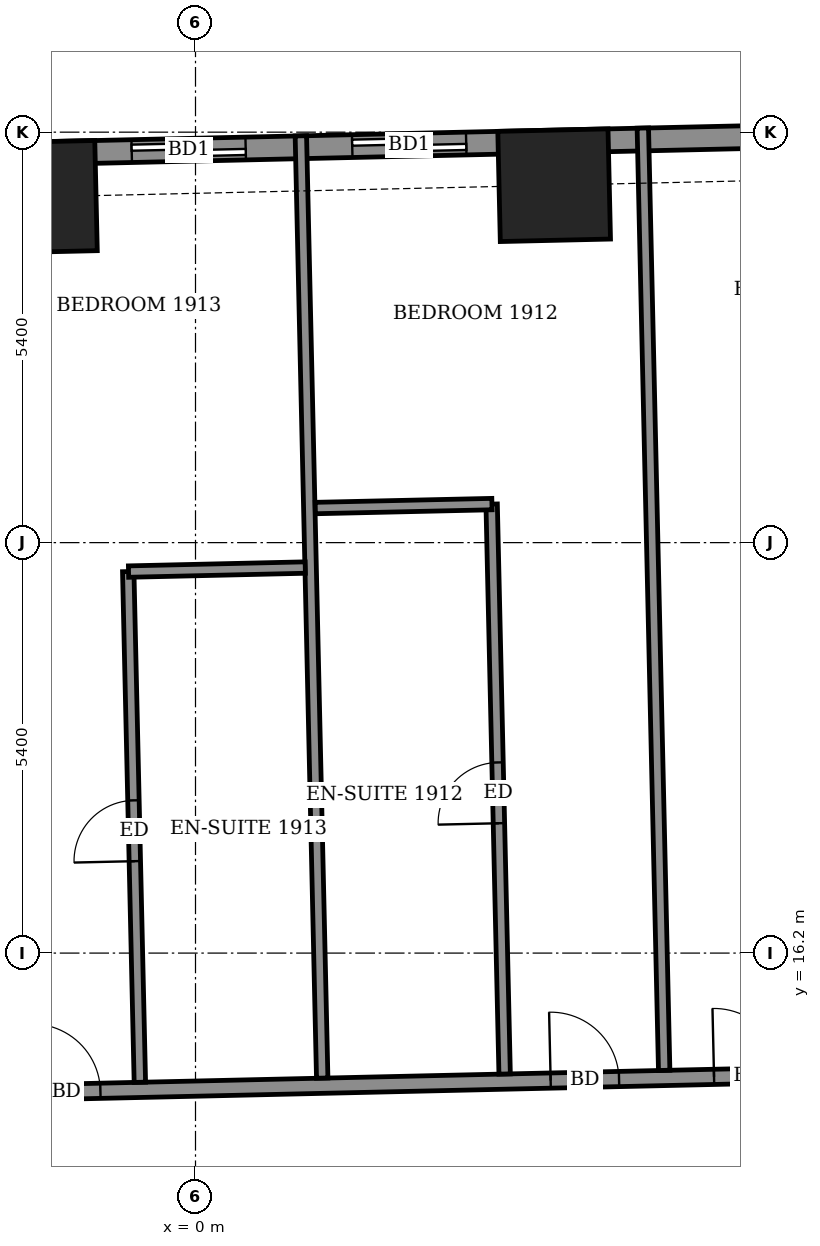
"""IFC4 building model, lengths in metres.
Left out: names, types, materials, properties, quantities, classifications, styles, units other than length and angle.
Written with IfcOpenShell. Run it as: python <this file> out.ifc"""

import sys

from ifc_helpers import new_model, si_unit, direction, frame, frame_2d, origin, origin_2d, place, context, subcontext, project, spatial, rectangle, extrude, element, fill, save


model = new_model("IFC4")
c1 = context("Model", 3, precision=1e-05, world=origin(), true_north=direction((0.0, 1.0)))
c2 = subcontext(c1, "Body", "Model", "MODEL_VIEW")
j1 = project(units=[si_unit("LENGTHUNIT", "METRE"), si_unit("PLANEANGLEUNIT", "RADIAN")], contexts=[c1])
p1 = place(None, origin())
s1 = spatial("IfcSite", under=j1, at=p1, CompositionType="ELEMENT")
p2 = place(p1, origin())
s2 = spatial("IfcBuilding", under=s1, at=p2, CompositionType="ELEMENT")
p3 = place(p2, frame((0.0, 0.0, 79.3)))
s3 = spatial("IfcBuildingStorey", under=s2, at=p3, CompositionType="ELEMENT", Elevation=79.3)
for number, where, z_axis, x_axis in (
    (1, (4.719, 26.302, -0.55), (0.0, 0.0, 1.0), (-1.0, -0.023, 0.0)),
    (2, (-2.033, 26.149, -0.55), (0.0, 0.0, 1.0), (-1.0, -0.023, 0.0)),
):
    element("IfcColumn", number, at=place(p3, frame(where, z_axis=z_axis, x_axis=x_axis)), inside=s3, PredefinedType="COLUMN", context=c2, shape_type="SweptSolid", body=[
        extrude(rectangle(XDim=1.45, YDim=1.45, at=origin_2d()), origin(), (0.0, 0.0, 1.0), 3.6),
    ])
p4 = place(p3, frame((24.809, 27.333, 0.0), z_axis=(0.0, 0.0, 1.0), x_axis=(-0.999742489858, -0.022692597327, 0.0)))
e3 = element("IfcWall", 3, at=p4, inside=s3, PredefinedType="SOLIDWALL", context=c2, shape_type="SweptSolid", body=[
    extrude(rectangle(XDim=46.972, YDim=0.3, at=frame_2d((23.486, 0.0))), origin(), (0.0, 0.0, 1.0), 3.05),
])
p5 = place(p4, frame((2.536, 0.0, 0.0)))
e4 = element("IfcOpeningElement", 4, at=p5, cuts=e3, PredefinedType="OPENING", context=c2, shape_type="SweptSolid", body=[
    extrude(rectangle(XDim=1.5, YDim=2.4, at=frame_2d((0.75, 1.2))), frame((0.0, 0.16, 0.0), z_axis=(0.0, -1.0, 0.0), x_axis=(1.0, 0.0, 0.0)), (0.0, 0.0, 1.0), 0.32),
])
p6 = place(p4, frame((7.726, 0.0, 0.0)))
e5 = element("IfcOpeningElement", 5, at=p6, cuts=e3, PredefinedType="OPENING", context=c2, shape_type="SweptSolid", body=[
    extrude(rectangle(XDim=1.5, YDim=2.4, at=frame_2d((0.75, 1.2))), frame((0.0, 0.16, 0.0), z_axis=(0.0, -1.0, 0.0), x_axis=(1.0, 0.0, 0.0)), (0.0, 0.0, 1.0), 0.32),
])
p7 = place(p4, frame((10.627, 0.0, 0.0)))
e6 = element("IfcOpeningElement", 6, at=p7, cuts=e3, PredefinedType="OPENING", context=c2, shape_type="SweptSolid", body=[
    extrude(rectangle(XDim=1.5, YDim=2.4, at=frame_2d((0.75, 1.2))), frame((0.0, 0.16, 0.0), z_axis=(0.0, -1.0, 0.0), x_axis=(1.0, 0.0, 0.0)), (0.0, 0.0, 1.0), 0.32),
])
p8 = place(p4, frame((15.872, 0.0, 0.0)))
e7 = element("IfcOpeningElement", 7, at=p8, cuts=e3, PredefinedType="OPENING", context=c2, shape_type="SweptSolid", body=[
    extrude(rectangle(XDim=1.5, YDim=2.4, at=frame_2d((0.75, 1.2))), frame((0.0, 0.16, 0.0), z_axis=(0.0, -1.0, 0.0), x_axis=(1.0, 0.0, 0.0)), (0.0, 0.0, 1.0), 0.32),
])
p9 = place(p4, frame((21.253, 0.0, 0.0)))
e8 = element("IfcOpeningElement", 8, at=p9, cuts=e3, PredefinedType="OPENING", context=c2, shape_type="SweptSolid", body=[
    extrude(rectangle(XDim=1.5, YDim=2.4, at=frame_2d((0.75, 1.2))), frame((0.0, 0.16, 0.0), z_axis=(0.0, -1.0, 0.0), x_axis=(1.0, 0.0, 0.0)), (0.0, 0.0, 1.0), 0.32),
])
p10 = place(p4, frame((24.155, 0.0, 0.0)))
e9 = element("IfcOpeningElement", 9, at=p10, cuts=e3, PredefinedType="OPENING", context=c2, shape_type="SweptSolid", body=[
    extrude(rectangle(XDim=1.5, YDim=2.4, at=frame_2d((0.75, 1.2))), frame((0.0, 0.16, 0.0), z_axis=(0.0, -1.0, 0.0), x_axis=(1.0, 0.0, 0.0)), (0.0, 0.0, 1.0), 0.32),
])
p11 = place(p4, frame((29.247, 0.0, 0.0)))
e10 = element("IfcOpeningElement", 10, at=p11, cuts=e3, PredefinedType="OPENING", context=c2, shape_type="SweptSolid", body=[
    extrude(rectangle(XDim=1.5, YDim=2.4, at=frame_2d((0.75, 1.2))), frame((0.0, 0.16, 0.0), z_axis=(0.0, -1.0, 0.0), x_axis=(1.0, 0.0, 0.0)), (0.0, 0.0, 1.0), 0.32),
])
p12 = place(p4, frame((34.581, 0.0, 0.0)))
e11 = element("IfcOpeningElement", 11, at=p12, cuts=e3, PredefinedType="OPENING", context=c2, shape_type="SweptSolid", body=[
    extrude(rectangle(XDim=1.5, YDim=2.4, at=frame_2d((0.75, 1.2))), frame((0.0, 0.16, 0.0), z_axis=(0.0, -1.0, 0.0), x_axis=(1.0, 0.0, 0.0)), (0.0, 0.0, 1.0), 0.32),
])
p13 = place(p4, frame((37.483, 0.0, 0.0)))
e12 = element("IfcOpeningElement", 12, at=p13, cuts=e3, PredefinedType="OPENING", context=c2, shape_type="SweptSolid", body=[
    extrude(rectangle(XDim=1.5, YDim=2.4, at=frame_2d((0.75, 1.2))), frame((0.0, 0.16, 0.0), z_axis=(0.0, -1.0, 0.0), x_axis=(1.0, 0.0, 0.0)), (0.0, 0.0, 1.0), 0.32),
])
p14 = place(p4, frame((42.35, 0.0, 0.9)))
e13 = element("IfcOpeningElement", 13, at=p14, cuts=e3, PredefinedType="OPENING", context=c2, shape_type="SweptSolid", body=[
    extrude(rectangle(XDim=2.4, YDim=1.5, at=frame_2d((1.2, 0.75))), frame((0.0, 0.16, 0.0), z_axis=(0.0, -1.0, 0.0), x_axis=(1.0, 0.0, 0.0)), (0.0, 0.0, 1.0), 0.32),
])
p15 = place(p3, frame((-24.895, 13.852, 0.0), z_axis=(0.0, 0.0, 1.0), x_axis=(0.999742765181, 0.02268046447, 0.0)))
e14 = element("IfcWall", 14, at=p15, inside=s3, PredefinedType="PARTITIONING", context=c2, shape_type="SweptSolid", body=[
    extrude(rectangle(XDim=52.422, YDim=0.2, at=frame_2d((26.211, 0.0))), origin(), (0.0, 0.0, 1.0), 3.05),
])
p16 = place(p15, frame((50.186, 0.0, 0.0)))
e15 = element("IfcOpeningElement", 15, at=p16, cuts=e14, PredefinedType="OPENING", context=c2, shape_type="SweptSolid", body=[
    extrude(rectangle(XDim=1.0, YDim=2.1, at=frame_2d((0.5, 1.05))), frame((0.0, 0.11, 0.0), z_axis=(0.0, -1.0, 0.0), x_axis=(1.0, 0.0, 0.0)), (0.0, 0.0, 1.0), 0.22),
])
p17 = place(p15, frame((45.175, 0.0, 0.0)))
e16 = element("IfcOpeningElement", 16, at=p17, cuts=e14, PredefinedType="OPENING", context=c2, shape_type="SweptSolid", body=[
    extrude(rectangle(XDim=0.9, YDim=2.1, at=frame_2d((0.45, 1.05))), frame((0.0, 0.11, 0.0), z_axis=(0.0, -1.0, 0.0), x_axis=(1.0, 0.0, 0.0)), (0.0, 0.0, 1.0), 0.22),
])
p18 = place(p15, frame((40.625, 0.0, 0.0)))
e17 = element("IfcOpeningElement", 17, at=p18, cuts=e14, PredefinedType="OPENING", context=c2, shape_type="SweptSolid", body=[
    extrude(rectangle(XDim=0.9, YDim=2.1, at=frame_2d((0.45, 1.05))), frame((0.0, 0.11, 0.0), z_axis=(0.0, -1.0, 0.0), x_axis=(1.0, 0.0, 0.0)), (0.0, 0.0, 1.0), 0.22),
])
p19 = place(p15, frame((38.65, 0.0, 0.0)))
e18 = element("IfcOpeningElement", 18, at=p19, cuts=e14, PredefinedType="OPENING", context=c2, shape_type="SweptSolid", body=[
    extrude(rectangle(XDim=0.9, YDim=2.1, at=frame_2d((0.45, 1.05))), frame((0.0, 0.11, 0.0), z_axis=(0.0, -1.0, 0.0), x_axis=(1.0, 0.0, 0.0)), (0.0, 0.0, 1.0), 0.22),
])
p20 = place(p15, frame((31.725, 0.0, 0.0)))
e19 = element("IfcOpeningElement", 19, at=p20, cuts=e14, PredefinedType="OPENING", context=c2, shape_type="SweptSolid", body=[
    extrude(rectangle(XDim=0.9, YDim=2.1, at=frame_2d((0.45, 1.05))), frame((0.0, 0.11, 0.0), z_axis=(0.0, -1.0, 0.0), x_axis=(1.0, 0.0, 0.0)), (0.0, 0.0, 1.0), 0.22),
])
p21 = place(p15, frame((29.575, 0.0, 0.0)))
e20 = element("IfcOpeningElement", 20, at=p21, cuts=e14, PredefinedType="OPENING", context=c2, shape_type="SweptSolid", body=[
    extrude(rectangle(XDim=0.9, YDim=2.1, at=frame_2d((0.45, 1.05))), frame((0.0, 0.11, 0.0), z_axis=(0.0, -1.0, 0.0), x_axis=(1.0, 0.0, 0.0)), (0.0, 0.0, 1.0), 0.22),
])
p22 = place(p15, frame((22.75, 0.0, 0.0)))
e21 = element("IfcOpeningElement", 21, at=p22, cuts=e14, PredefinedType="OPENING", context=c2, shape_type="SweptSolid", body=[
    extrude(rectangle(XDim=0.9, YDim=2.1, at=frame_2d((0.45, 1.05))), frame((0.0, 0.11, 0.0), z_axis=(0.0, -1.0, 0.0), x_axis=(1.0, 0.0, 0.0)), (0.0, 0.0, 1.0), 0.22),
])
p23 = place(p15, frame((20.75, 0.0, 0.0)))
e22 = element("IfcOpeningElement", 22, at=p23, cuts=e14, PredefinedType="OPENING", context=c2, shape_type="SweptSolid", body=[
    extrude(rectangle(XDim=0.9, YDim=2.1, at=frame_2d((0.45, 1.05))), frame((0.0, 0.11, 0.0), z_axis=(0.0, -1.0, 0.0), x_axis=(1.0, 0.0, 0.0)), (0.0, 0.0, 1.0), 0.22),
])
p24 = place(p15, frame((13.95, 0.0, 0.0)))
e23 = element("IfcOpeningElement", 23, at=p24, cuts=e14, PredefinedType="OPENING", context=c2, shape_type="SweptSolid", body=[
    extrude(rectangle(XDim=0.9, YDim=2.1, at=frame_2d((0.45, 1.05))), frame((0.0, 0.11, 0.0), z_axis=(0.0, -1.0, 0.0), x_axis=(1.0, 0.0, 0.0)), (0.0, 0.0, 1.0), 0.22),
])
p25 = place(p15, frame((11.85, 0.0, 0.0)))
e24 = element("IfcOpeningElement", 24, at=p25, cuts=e14, PredefinedType="OPENING", context=c2, shape_type="SweptSolid", body=[
    extrude(rectangle(XDim=0.9, YDim=2.1, at=frame_2d((0.45, 1.05))), frame((0.0, 0.11, 0.0), z_axis=(0.0, -1.0, 0.0), x_axis=(1.0, 0.0, 0.0)), (0.0, 0.0, 1.0), 0.22),
])
p26 = place(p15, frame((1.425, 0.0, 0.0)))
e25 = element("IfcOpeningElement", 25, at=p26, cuts=e14, PredefinedType="OPENING", context=c2, shape_type="SweptSolid", body=[
    extrude(rectangle(XDim=1.0, YDim=2.1, at=frame_2d((0.5, 1.05))), frame((0.0, 0.11, 0.0), z_axis=(0.0, -1.0, 0.0), x_axis=(1.0, 0.0, 0.0)), (0.0, 0.0, 1.0), 0.22),
])
p27 = place(p15, frame((6.925, 0.0, 0.0)))
e26 = element("IfcOpeningElement", 26, at=p27, cuts=e14, PredefinedType="OPENING", context=c2, shape_type="SweptSolid", body=[
    extrude(rectangle(XDim=0.9, YDim=2.1, at=frame_2d((0.45, 1.05))), frame((0.0, 0.11, 0.0), z_axis=(0.0, -1.0, 0.0), x_axis=(1.0, 0.0, 0.0)), (0.0, 0.0, 1.0), 0.22),
])
p28 = place(p3, frame((-0.732, 14.5, 0.0), z_axis=(0.0, 0.0, 1.0), x_axis=(-0.022776692057, 0.999740577499, 0.0)))
e27 = element("IfcWall", 27, at=p28, inside=s3, PredefinedType="PARTITIONING", context=c2, shape_type="SweptSolid", body=[
    extrude(rectangle(XDim=6.721, YDim=0.15, at=frame_2d((3.36, 0.0))), origin(), (0.0, 0.0, 1.0), 3.05),
])
p29 = place(p28, frame((2.91, 0.0, 0.0)))
e28 = element("IfcOpeningElement", 28, at=p29, cuts=e27, PredefinedType="OPENING", context=c2, shape_type="SweptSolid", body=[
    extrude(rectangle(XDim=0.8, YDim=2.1, at=frame_2d((0.4, 1.05))), frame((0.0, 0.085, 0.0), z_axis=(0.0, -1.0, 0.0), x_axis=(1.0, 0.0, 0.0)), (0.0, 0.0, 1.0), 0.17),
])
p30 = place(p3, frame((1.667, 14.555, 0.0), z_axis=(0.0, 0.0, 1.0), x_axis=(-0.022661475803, 0.999743195783, 0.0)))
e29 = element("IfcWall", 29, at=p30, inside=s3, PredefinedType="PARTITIONING", context=c2, shape_type="SweptSolid", body=[
    extrude(rectangle(XDim=12.4, YDim=0.15, at=frame_2d((6.2, 0.0))), origin(), (0.0, 0.0, 1.0), 2.55),
])
p31 = place(p3, frame((4.067, 14.609, 0.0), z_axis=(0.0, 0.0, 1.0), x_axis=(-0.022786475911, 0.99974035455, 0.0)))
e30 = element("IfcWall", 30, at=p31, inside=s3, PredefinedType="PARTITIONING", context=c2, shape_type="SweptSolid", body=[
    extrude(rectangle(XDim=7.5, YDim=0.15, at=frame_2d((3.75, 0.0))), origin(), (0.0, 0.0, 1.0), 3.05),
])
p32 = place(p31, frame((3.3, 0.0, 0.0)))
e31 = element("IfcOpeningElement", 31, at=p32, cuts=e30, PredefinedType="OPENING", context=c2, shape_type="SweptSolid", body=[
    extrude(rectangle(XDim=0.8, YDim=2.1, at=frame_2d((0.4, 1.05))), frame((0.0, 0.085, 0.0), z_axis=(0.0, -1.0, 0.0), x_axis=(1.0, 0.0, 0.0)), (0.0, 0.0, 1.0), 0.17),
])
p33 = place(p3, frame((6.166, 14.657, 0.0), z_axis=(0.0, 0.0, 1.0), x_axis=(-0.022661475803, 0.999743195783, 0.0)))
e32 = element("IfcWall", 32, at=p33, inside=s3, PredefinedType="PARTITIONING", context=c2, shape_type="SweptSolid", body=[
    extrude(rectangle(XDim=12.4, YDim=0.15, at=frame_2d((6.2, 0.0))), origin(), (0.0, 0.0, 1.0), 2.55),
])
p34 = place(p3, frame((-0.881, 21.219, 0.0), z_axis=(0.0, 0.0, 1.0), x_axis=(0.99974053329, 0.022778632478, 0.0)))
e33 = element("IfcWall", 33, at=p34, inside=s3, PredefinedType="PARTITIONING", context=c2, shape_type="SweptSolid", body=[
    extrude(rectangle(XDim=2.326, YDim=0.15, at=frame_2d((1.163, 0.0))), origin(), (0.0, 0.0, 1.0), 3.05),
])
p35 = place(p3, frame((1.576, 22.055, 0.0), z_axis=(0.0, 0.0, 1.0), x_axis=(0.999749744571, 0.022370700241, 0.0)))
e34 = element("IfcWall", 34, at=p35, inside=s3, PredefinedType="PARTITIONING", context=c2, shape_type="SweptSolid", body=[
    extrude(rectangle(XDim=2.324, YDim=0.15, at=frame_2d((1.162, 0.0))), origin(), (0.0, 0.0, 1.0), 3.05),
])
p36 = place(p9, origin())
e35 = element("IfcDoor", 35, at=p36, inside=s3, OperationType="SLIDING_TO_LEFT", PredefinedType="DOOR", context=c2, shape_type="SweptSolid", body=[
    extrude(rectangle(XDim=1.5, YDim=2.4, at=frame_2d((0.75, 1.2))), frame((0.0, 0.025, 0.0), z_axis=(0.0, -1.0, 0.0), x_axis=(1.0, 0.0, 0.0)), (0.0, 0.0, 1.0), 0.05),
])
fill(e8, e35)
p37 = place(p10, origin())
e36 = element("IfcDoor", 36, at=p37, inside=s3, OperationType="SLIDING_TO_LEFT", PredefinedType="DOOR", context=c2, shape_type="SweptSolid", body=[
    extrude(rectangle(XDim=1.5, YDim=2.4, at=frame_2d((0.75, 1.2))), frame((0.0, 0.025, 0.0), z_axis=(0.0, -1.0, 0.0), x_axis=(1.0, 0.0, 0.0)), (0.0, 0.0, 1.0), 0.05),
])
fill(e9, e36)
p38 = place(p20, origin())
e37 = element("IfcDoor", 37, at=p38, inside=s3, OperationType="SINGLE_SWING_LEFT", PredefinedType="DOOR", context=c2, shape_type="SweptSolid", body=[
    extrude(rectangle(XDim=0.9, YDim=2.1, at=frame_2d((0.45, 1.05))), frame((0.0, 0.025, 0.0), z_axis=(0.0, -1.0, 0.0), x_axis=(1.0, 0.0, 0.0)), (0.0, 0.0, 1.0), 0.05),
])
fill(e19, e37)
p39 = place(p21, origin())
e38 = element("IfcDoor", 38, at=p39, inside=s3, OperationType="SINGLE_SWING_RIGHT", PredefinedType="DOOR", context=c2, shape_type="SweptSolid", body=[
    extrude(rectangle(XDim=0.9, YDim=2.1, at=frame_2d((0.45, 1.05))), frame((0.0, 0.025, 0.0), z_axis=(0.0, -1.0, 0.0), x_axis=(1.0, 0.0, 0.0)), (0.0, 0.0, 1.0), 0.05),
])
fill(e20, e38)
p40 = place(p32, origin())
e39 = element("IfcDoor", 39, at=p40, inside=s3, OperationType="SINGLE_SWING_RIGHT", PredefinedType="DOOR", context=c2, shape_type="SweptSolid", body=[
    extrude(rectangle(XDim=0.8, YDim=2.1, at=frame_2d((0.4, 1.05))), frame((0.0, 0.025, 0.0), z_axis=(0.0, -1.0, 0.0), x_axis=(1.0, 0.0, 0.0)), (0.0, 0.0, 1.0), 0.05),
])
fill(e31, e39)
p41 = place(p22, origin())
e40 = element("IfcDoor", 40, at=p41, inside=s3, OperationType="SINGLE_SWING_LEFT", PredefinedType="DOOR", context=c2, shape_type="SweptSolid", body=[
    extrude(rectangle(XDim=0.9, YDim=2.1, at=frame_2d((0.45, 1.05))), frame((0.0, 0.025, 0.0), z_axis=(0.0, -1.0, 0.0), x_axis=(1.0, 0.0, 0.0)), (0.0, 0.0, 1.0), 0.05),
])
fill(e21, e40)
p42 = place(p29, origin())
e41 = element("IfcDoor", 41, at=p42, inside=s3, OperationType="SINGLE_SWING_LEFT", PredefinedType="DOOR", context=c2, shape_type="SweptSolid", body=[
    extrude(rectangle(XDim=0.8, YDim=2.1, at=frame_2d((0.4, 1.05))), frame((0.0, 0.025, 0.0), z_axis=(0.0, -1.0, 0.0), x_axis=(1.0, 0.0, 0.0)), (0.0, 0.0, 1.0), 0.05),
])
fill(e28, e41)
save(model, sys.argv[1])
